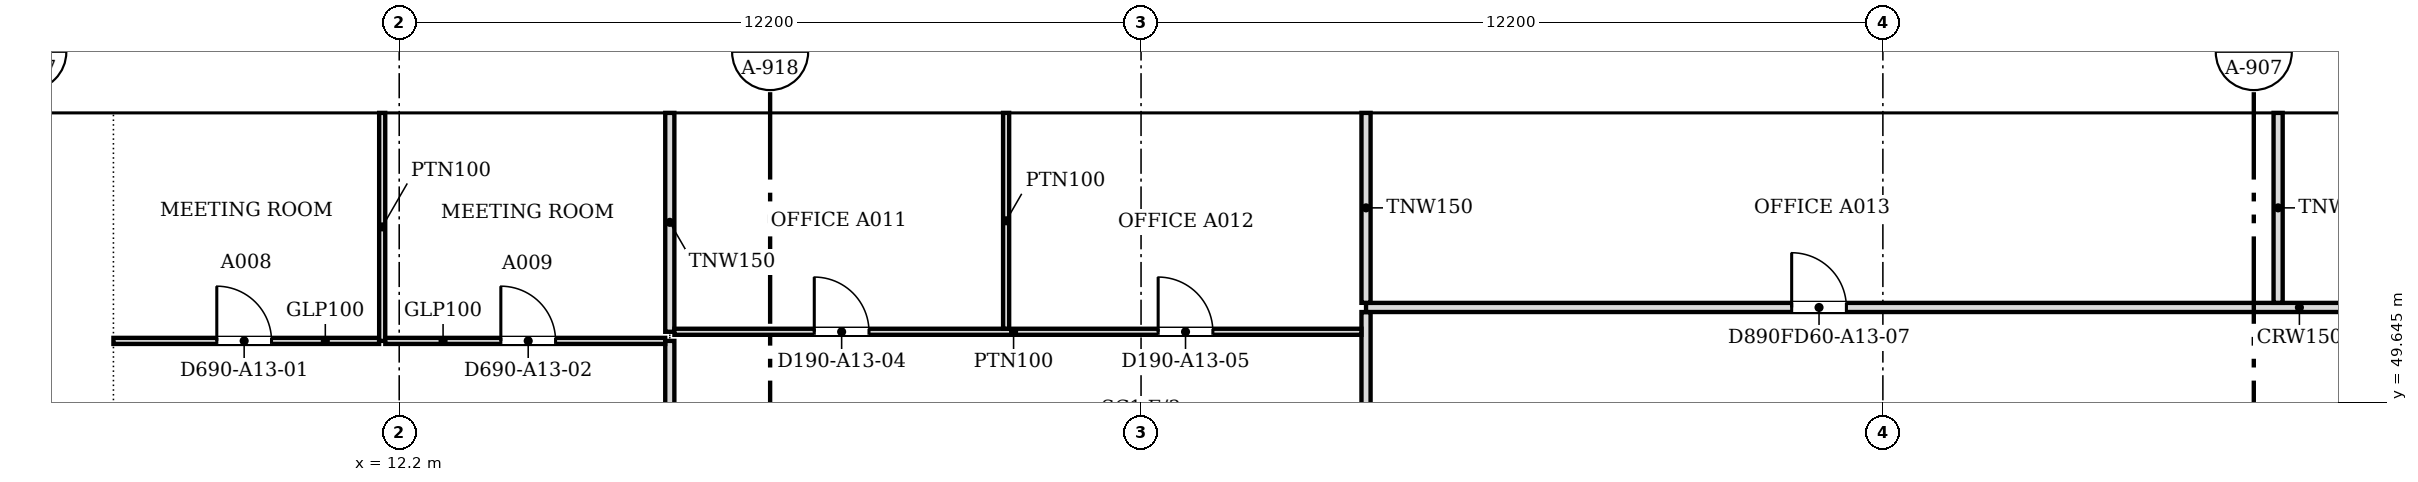
"""IFC4 building model, lengths in metres.
Left out: names, types, materials, properties, quantities, classifications, styles, units other than length and angle.
Written with IfcOpenShell. Run it as: python <this file> out.ifc"""

import sys

from ifc_helpers import new_model, si_unit, direction, frame, frame_2d, origin, place, context, subcontext, project, spatial, polyline, rectangle, outline, extrude, faceted_brep, source, transform, mapped, element, fill, save


model = new_model("IFC4")
c1 = context("Model", 3, precision=1e-05, world=origin(), true_north=direction((0.0, 1.0)))
c2 = subcontext(c1, "Body", "Model", "MODEL_VIEW")
j1 = project(units=[si_unit("LENGTHUNIT", "METRE"), si_unit("PLANEANGLEUNIT", "RADIAN")], contexts=[c1])
p1 = place(None, origin())
s1 = spatial("IfcSite", under=j1, at=p1, CompositionType="ELEMENT")
p2 = place(p1, origin())
s2 = spatial("IfcBuilding", under=s1, at=p2, CompositionType="ELEMENT")
p3 = place(p2, frame((0.0, 0.0, 146.8)))
s3 = spatial("IfcBuildingStorey", under=s2, at=p3, CompositionType="ELEMENT", Elevation=146.8)
m1 = source(origin(), c2, "Body", "SweptSolid", [
    extrude(outline(polyline([(3.05, 0.0), (6.1, 3.8), (3.05, 7.6), (0.0, 3.8), (3.05, 0.0)])), frame((0.0, 0.25, 0.0), z_axis=(0.0, -1.0, 0.0), x_axis=(1.0, 0.0, 0.0)), (0.0, 0.0, 1.0), 0.5),
])
p4 = place(p3, frame((48.8, 54.65, -3.8), z_axis=(0.0, 0.0, 1.0), x_axis=(-1.0, 0.0, 0.0)))
e1 = element("IfcWall", 1, at=p4, inside=s3, PredefinedType="SOLIDWALL", context=c2, shape_type="MappedRepresentation", body=[
    mapped(m1, transform((0.0, 0.0, 0.0), scale=1.0)),
])
m2 = source(origin(), c2, "Body", "SweptSolid", [
    extrude(outline(polyline([(3.05, 0.399), (5.78, 3.8), (3.05, 7.201), (0.321, 3.8), (3.05, 0.399)])), frame((0.0, 0.26, 0.0), z_axis=(0.0, -1.0, 0.0), x_axis=(1.0, 0.0, 0.0)), (0.0, 0.0, 1.0), 0.52),
])
p5 = place(p4, origin())
e2 = element("IfcOpeningElement", 2, at=p5, cuts=e1, PredefinedType="OPENING", context=c2, shape_type="MappedRepresentation", body=[
    mapped(m2, transform((0.0, 0.0, 0.0), scale=1.0)),
])
m3 = source(origin(), c2, "Body", "Brep", [
    faceted_brep([(3.05, -0.25, 0.0), (6.1, -0.25, 3.8), (6.1, -0.25, 3.8), (3.05, -0.25, 7.6), (0.0, -0.25, 3.8), (0.0, 0.25, 3.8), (3.05, 0.25, 7.6), (6.1, 0.25, 3.8), (6.1, 0.25, 3.8), (3.05, 0.25, 0.0)], [[[0, 1, 2, 3, 4]], [[5, 6, 7, 8, 9]], [[9, 8, 1, 0]], [[7, 6, 3, 2]], [[6, 5, 4, 3]], [[5, 9, 0, 4]], [[1, 8, 7, 2]]]),
])
p6 = place(p3, frame((42.7, 54.65, -3.8), z_axis=(0.0, 0.0, 1.0), x_axis=(-1.0, 0.0, 0.0)))
e3 = element("IfcWall", 3, at=p6, inside=s3, PredefinedType="SOLIDWALL", context=c2, shape_type="MappedRepresentation", body=[
    mapped(m3, transform((0.0, 0.0, 0.0), scale=1.0)),
])
p7 = place(p6, origin())
e4 = element("IfcOpeningElement", 4, at=p7, cuts=e3, PredefinedType="OPENING", context=c2, shape_type="MappedRepresentation", body=[
    mapped(m2, transform((0.0, 0.0, 0.0), scale=1.0)),
])
p8 = place(p3, frame((36.6, 54.65, -3.8), z_axis=(0.0, 0.0, 1.0), x_axis=(-1.0, 0.0, 0.0)))
e5 = element("IfcWall", 5, at=p8, inside=s3, PredefinedType="SOLIDWALL", context=c2, shape_type="MappedRepresentation", body=[
    mapped(m1, transform((0.0, 0.0, 0.0), scale=1.0)),
])
p9 = place(p8, origin())
e6 = element("IfcOpeningElement", 6, at=p9, cuts=e5, PredefinedType="OPENING", context=c2, shape_type="MappedRepresentation", body=[
    mapped(m2, transform((0.0, 0.0, 0.0), scale=1.0)),
])
p10 = place(p3, frame((30.5, 54.65, -3.8), z_axis=(0.0, 0.0, 1.0), x_axis=(-1.0, 0.0, 0.0)))
e7 = element("IfcWall", 7, at=p10, inside=s3, PredefinedType="SOLIDWALL", context=c2, shape_type="MappedRepresentation", body=[
    mapped(m1, transform((0.0, 0.0, 0.0), scale=1.0)),
])
p11 = place(p10, origin())
e8 = element("IfcOpeningElement", 8, at=p11, cuts=e7, PredefinedType="OPENING", context=c2, shape_type="MappedRepresentation", body=[
    mapped(m2, transform((0.0, 0.0, 0.0), scale=1.0)),
])
p12 = place(p3, frame((24.4, 54.65, -3.8), z_axis=(0.0, 0.0, 1.0), x_axis=(-1.0, 0.0, 0.0)))
e9 = element("IfcWall", 9, at=p12, inside=s3, PredefinedType="SOLIDWALL", context=c2, shape_type="MappedRepresentation", body=[
    mapped(m3, transform((0.0, 0.0, 0.0), scale=1.0)),
])
p13 = place(p12, origin())
e10 = element("IfcOpeningElement", 10, at=p13, cuts=e9, PredefinedType="OPENING", context=c2, shape_type="MappedRepresentation", body=[
    mapped(m2, transform((0.0, 0.0, 0.0), scale=1.0)),
])
p14 = place(p3, frame((18.3, 54.65, -3.8), z_axis=(0.0, 0.0, 1.0), x_axis=(-1.0, 0.0, 0.0)))
e11 = element("IfcWall", 11, at=p14, inside=s3, PredefinedType="SOLIDWALL", context=c2, shape_type="MappedRepresentation", body=[
    mapped(m1, transform((0.0, 0.0, 0.0), scale=1.0)),
])
p15 = place(p14, origin())
e12 = element("IfcOpeningElement", 12, at=p15, cuts=e11, PredefinedType="OPENING", context=c2, shape_type="MappedRepresentation", body=[
    mapped(m2, transform((0.0, 0.0, 0.0), scale=1.0)),
])
m4 = source(origin(), c2, "Body", "Brep", [
    faceted_brep([(3.05, -0.25, 0.0), (6.053, -0.25, 3.8), (3.05, -0.25, 7.6), (0.0, -0.25, 3.8), (0.0, 0.25, 3.8), (3.05, 0.25, 7.6), (6.007, 0.25, 3.859), (6.007, 0.25, 3.741), (3.05, 0.25, 0.0), (6.053, 0.0, 3.8)], [[[0, 1, 2, 3]], [[4, 5, 6, 7, 8]], [[8, 7, 9, 1, 0]], [[6, 5, 2, 1, 9]], [[5, 4, 3, 2]], [[4, 8, 0, 3]], [[9, 7, 6]]]),
])
p16 = place(p3, frame((12.2, 54.65, -3.8), z_axis=(0.0, 0.0, 1.0), x_axis=(-1.0, 0.0, 0.0)))
e13 = element("IfcWall", 13, at=p16, inside=s3, PredefinedType="SOLIDWALL", context=c2, shape_type="MappedRepresentation", body=[
    mapped(m4, transform((0.0, 0.0, 0.0), scale=1.0)),
])
m5 = source(origin(), c2, "Body", "SweptSolid", [
    extrude(outline(polyline([(3.049, 0.401), (5.735, 3.8), (3.049, 7.199), (0.321, 3.8), (3.049, 0.401)])), frame((0.0, 0.26, 0.0), z_axis=(0.0, -1.0, 0.0), x_axis=(1.0, 0.0, 0.0)), (0.0, 0.0, 1.0), 0.52),
])
p17 = place(p16, origin())
e14 = element("IfcOpeningElement", 14, at=p17, cuts=e13, PredefinedType="OPENING", context=c2, shape_type="MappedRepresentation", body=[
    mapped(m5, transform((0.0, 0.0, 0.0), scale=1.0)),
])
m6 = source(origin(), c2, "Body", "SweptSolid", [
    extrude(outline(polyline([(3.05, 0.0), (6.1, 3.8), (0.0, 3.8), (3.05, 0.0)])), frame((0.0, 0.25, 0.0), z_axis=(0.0, -1.0, 0.0), x_axis=(1.0, 0.0, 0.0)), (0.0, 0.0, 1.0), 0.5),
])
p18 = place(p3, frame((45.75, 54.65, 0.0), z_axis=(0.0, 0.0, 1.0), x_axis=(-1.0, 0.0, 0.0)))
e15 = element("IfcWall", 15, at=p18, inside=s3, PredefinedType="SOLIDWALL", context=c2, shape_type="MappedRepresentation", body=[
    mapped(m6, transform((0.0, 0.0, 0.0), scale=1.0)),
])
m7 = source(origin(), c2, "Body", "SweptSolid", [
    extrude(outline(polyline([(3.05, 0.399), (5.579, 3.55), (0.521, 3.55), (3.05, 0.399)])), frame((0.0, 0.26, 0.0), z_axis=(0.0, -1.0, 0.0), x_axis=(1.0, 0.0, 0.0)), (0.0, 0.0, 1.0), 0.52),
])
p19 = place(p18, origin())
e16 = element("IfcOpeningElement", 16, at=p19, cuts=e15, PredefinedType="OPENING", context=c2, shape_type="MappedRepresentation", body=[
    mapped(m7, transform((0.0, 0.0, 0.0), scale=1.0)),
])
m8 = source(origin(), c2, "Body", "Brep", [
    faceted_brep([(3.05, -0.25, 0.0), (6.1, -0.25, 3.8), (6.1, -0.25, 3.8), (0.0, -0.25, 3.8), (0.0, 0.25, 3.8), (6.1, 0.25, 3.8), (6.1, 0.25, 3.8), (3.05, 0.25, 0.0)], [[[0, 1, 2, 3]], [[4, 5, 6, 7]], [[7, 6, 1, 0]], [[5, 4, 3, 2]], [[4, 7, 0, 3]], [[1, 6, 5, 2]]]),
])
p20 = place(p3, frame((39.65, 54.65, 0.0), z_axis=(0.0, 0.0, 1.0), x_axis=(-1.0, 0.0, 0.0)))
e17 = element("IfcWall", 17, at=p20, inside=s3, PredefinedType="SOLIDWALL", context=c2, shape_type="MappedRepresentation", body=[
    mapped(m8, transform((0.0, 0.0, 0.0), scale=1.0)),
])
p21 = place(p20, origin())
e18 = element("IfcOpeningElement", 18, at=p21, cuts=e17, PredefinedType="OPENING", context=c2, shape_type="MappedRepresentation", body=[
    mapped(m7, transform((0.0, 0.0, 0.0), scale=1.0)),
])
p22 = place(p3, frame((33.55, 54.65, 0.0), z_axis=(0.0, 0.0, 1.0), x_axis=(-1.0, 0.0, 0.0)))
e19 = element("IfcWall", 19, at=p22, inside=s3, PredefinedType="SOLIDWALL", context=c2, shape_type="MappedRepresentation", body=[
    mapped(m6, transform((0.0, 0.0, 0.0), scale=1.0)),
])
p23 = place(p22, origin())
e20 = element("IfcOpeningElement", 20, at=p23, cuts=e19, PredefinedType="OPENING", context=c2, shape_type="MappedRepresentation", body=[
    mapped(m7, transform((0.0, 0.0, 0.0), scale=1.0)),
])
p24 = place(p3, frame((27.45, 54.65, 0.0), z_axis=(0.0, 0.0, 1.0), x_axis=(-1.0, 0.0, 0.0)))
e21 = element("IfcWall", 21, at=p24, inside=s3, PredefinedType="SOLIDWALL", context=c2, shape_type="MappedRepresentation", body=[
    mapped(m8, transform((0.0, 0.0, 0.0), scale=1.0)),
])
p25 = place(p24, origin())
e22 = element("IfcOpeningElement", 22, at=p25, cuts=e21, PredefinedType="OPENING", context=c2, shape_type="MappedRepresentation", body=[
    mapped(m7, transform((0.0, 0.0, 0.0), scale=1.0)),
])
p26 = place(p3, frame((21.35, 54.65, 0.0), z_axis=(0.0, 0.0, 1.0), x_axis=(-1.0, 0.0, 0.0)))
e23 = element("IfcWall", 23, at=p26, inside=s3, PredefinedType="SOLIDWALL", context=c2, shape_type="MappedRepresentation", body=[
    mapped(m6, transform((0.0, 0.0, 0.0), scale=1.0)),
])
p27 = place(p26, origin())
e24 = element("IfcOpeningElement", 24, at=p27, cuts=e23, PredefinedType="OPENING", context=c2, shape_type="MappedRepresentation", body=[
    mapped(m7, transform((0.0, 0.0, 0.0), scale=1.0)),
])
p28 = place(p3, frame((15.25, 54.65, 0.0), z_axis=(0.0, 0.0, 1.0), x_axis=(-1.0, 0.0, 0.0)))
e25 = element("IfcWall", 25, at=p28, inside=s3, PredefinedType="SOLIDWALL", context=c2, shape_type="MappedRepresentation", body=[
    mapped(m6, transform((0.0, 0.0, 0.0), scale=1.0)),
])
p29 = place(p28, origin())
e26 = element("IfcOpeningElement", 26, at=p29, cuts=e25, PredefinedType="OPENING", context=c2, shape_type="MappedRepresentation", body=[
    mapped(m7, transform((0.0, 0.0, 0.0), scale=1.0)),
])
m9 = source(origin(), c2, "Body", "Brep", [
    faceted_brep([(3.003, -0.25, 0.0), (3.05, -0.25, 0.06), (3.05, -0.25, 3.8), (0.0, -0.25, 3.8), (0.0, 0.25, 3.8), (2.957, 0.25, 3.8), (2.957, 0.25, 0.059), (3.003, 0.0, 0.0)], [[[0, 1, 2, 3]], [[4, 5, 6]], [[1, 0, 7]], [[5, 4, 3, 2]], [[4, 6, 7, 0, 3]], [[1, 7, 6, 5, 2]]]),
])
p30 = place(p3, frame((9.15, 54.65, 0.0), z_axis=(0.0, 0.0, 1.0), x_axis=(-1.0, 0.0, 0.0)))
e27 = element("IfcWall", 27, at=p30, inside=s3, PredefinedType="SOLIDWALL", context=c2, shape_type="MappedRepresentation", body=[
    mapped(m9, transform((0.0, 0.0, 0.0), scale=1.0)),
])
m10 = source(origin(), c2, "Body", "SweptSolid", [
    extrude(outline(polyline([(2.803, 3.55), (0.516, 3.55), (2.803, 0.656), (2.803, 3.55)])), frame((0.0, 0.26, 0.0), z_axis=(0.0, -1.0, 0.0), x_axis=(1.0, 0.0, 0.0)), (0.0, 0.0, 1.0), 0.52),
])
p31 = place(p30, origin())
e28 = element("IfcOpeningElement", 28, at=p31, cuts=e27, PredefinedType="OPENING", context=c2, shape_type="MappedRepresentation", body=[
    mapped(m10, transform((0.0, 0.0, 0.0), scale=1.0)),
])
p32 = place(p3, frame((16.65, 47.376, 0.0), z_axis=(0.0, 0.0, 1.0), x_axis=(0.0, 1.0, 0.0)))
e29 = element("IfcWall", 29, at=p32, inside=s3, PredefinedType="PARTITIONING", context=c2, shape_type="SweptSolid", body=[
    extrude(rectangle(XDim=3.274, YDim=0.15, at=frame_2d((1.637, 0.0))), origin(), (0.0, 0.0, 1.0), 2.888),
])
p33 = place(p3, frame((28.1, 47.376, 0.0), z_axis=(0.0, 0.0, 1.0), x_axis=(0.0, 1.0, 0.0)))
e30 = element("IfcWall", 30, at=p33, inside=s3, PredefinedType="PARTITIONING", context=c2, shape_type="SweptSolid", body=[
    extrude(rectangle(XDim=3.748, YDim=0.15, at=frame_2d((1.874, 0.0))), origin(), (0.0, 0.0, 1.0), 2.888),
])
p34 = place(p3, frame((7.5, 50.65, 0.0), z_axis=(0.0, 0.0, 1.0), x_axis=(1.0, 0.0, 0.0)))
e31 = element("IfcWall", 31, at=p34, inside=s3, PredefinedType="PARTITIONING", context=c2, shape_type="SweptSolid", body=[
    extrude(rectangle(XDim=4.369, YDim=0.1, at=frame_2d((2.185, 0.0))), origin(), (0.0, 0.0, 1.0), 2.888),
])
m11 = source(origin(), c2, "Body", "SweptSolid", [
    extrude(rectangle(XDim=0.9, YDim=2.1, at=frame_2d((0.45, 1.05))), frame((0.0, 0.06, 0.0), z_axis=(0.0, -1.0, 0.0), x_axis=(1.0, 0.0, 0.0)), (0.0, 0.0, 1.0), 0.12),
])
p35 = place(p34, frame((1.7, 0.0, 0.0)))
e32 = element("IfcOpeningElement", 32, at=p35, cuts=e31, PredefinedType="OPENING", context=c2, shape_type="MappedRepresentation", body=[
    mapped(m11, transform((0.0, 0.0, 0.0), scale=1.0)),
])
p36 = place(p3, frame((11.92, 50.65, 0.0), z_axis=(0.0, 0.0, 1.0), x_axis=(0.0, 1.0, 0.0)))
e33 = element("IfcWall", 33, at=p36, inside=s3, PredefinedType="PARTITIONING", context=c2, shape_type="SweptSolid", body=[
    extrude(rectangle(XDim=3.75, YDim=0.1, at=frame_2d((1.875, 0.0))), origin(), (0.0, 0.0, 1.0), 2.888),
])
p37 = place(p3, frame((11.971, 50.65, 0.0), z_axis=(0.0, 0.0, 1.0), x_axis=(1.0, 0.0, 0.0)))
e34 = element("IfcWall", 34, at=p37, inside=s3, PredefinedType="PARTITIONING", context=c2, shape_type="SweptSolid", body=[
    extrude(rectangle(XDim=4.603, YDim=0.1, at=frame_2d((2.301, 0.0))), origin(), (0.0, 0.0, 1.0), 2.888),
])
p38 = place(p37, frame((1.9, 0.0, 0.0)))
e35 = element("IfcOpeningElement", 35, at=p38, cuts=e34, PredefinedType="OPENING", context=c2, shape_type="MappedRepresentation", body=[
    mapped(m11, transform((0.0, 0.0, 0.0), scale=1.0)),
])
p39 = place(p3, frame((16.65, 50.8, 0.0), z_axis=(0.0, 0.0, 1.0), x_axis=(0.0, 1.0, 0.0)))
e36 = element("IfcWall", 36, at=p39, inside=s3, PredefinedType="PARTITIONING", context=c2, shape_type="SweptSolid", body=[
    extrude(rectangle(XDim=3.6, YDim=0.15, at=frame_2d((1.8, 0.0))), origin(), (0.0, 0.0, 1.0), 2.888),
])
p40 = place(p3, frame((16.726, 50.8, 0.0), z_axis=(0.0, 0.0, 1.0), x_axis=(1.0, 0.0, 0.0)))
e37 = element("IfcWall", 37, at=p40, inside=s3, PredefinedType="PARTITIONING", context=c2, shape_type="SweptSolid", body=[
    extrude(rectangle(XDim=11.298, YDim=0.1, at=frame_2d((5.649, 0.0))), origin(), (0.0, 0.0, 1.0), 2.888),
])
p41 = place(p40, frame((2.3, 0.0, 0.0)))
e38 = element("IfcOpeningElement", 38, at=p41, cuts=e37, PredefinedType="OPENING", context=c2, shape_type="MappedRepresentation", body=[
    mapped(m11, transform((0.0, 0.0, 0.0), scale=1.0)),
])
p42 = place(p40, frame((7.955, 0.0, 0.0)))
e39 = element("IfcOpeningElement", 39, at=p42, cuts=e37, PredefinedType="OPENING", context=c2, shape_type="MappedRepresentation", body=[
    mapped(m11, transform((0.0, 0.0, 0.0), scale=1.0)),
])
p43 = place(p3, frame((22.181, 50.851, 0.0), z_axis=(0.0, 0.0, 1.0), x_axis=(0.0, 1.0, 0.0)))
e40 = element("IfcWall", 40, at=p43, inside=s3, PredefinedType="PARTITIONING", context=c2, shape_type="SweptSolid", body=[
    extrude(rectangle(XDim=3.549, YDim=0.1, at=frame_2d((1.774, 0.0))), origin(), (0.0, 0.0, 1.0), 2.888),
])
p44 = place(p3, frame((28.1, 51.2, 0.0), z_axis=(0.0, 0.0, 1.0), x_axis=(1.0, 0.0, 0.0)))
e41 = element("IfcWall", 41, at=p44, inside=s3, PredefinedType="PARTITIONING", context=c2, shape_type="SweptSolid", body=[
    extrude(rectangle(XDim=31.438, YDim=0.15, at=frame_2d((15.719, 0.0))), origin(), (0.0, 0.0, 1.0), 2.888),
])
m12 = source(origin(), c2, "Body", "SweptSolid", [
    extrude(rectangle(XDim=0.9, YDim=2.1, at=frame_2d((0.45, 1.05))), frame((0.0, 0.085, 0.0), z_axis=(0.0, -1.0, 0.0), x_axis=(1.0, 0.0, 0.0)), (0.0, 0.0, 1.0), 0.17),
])
p45 = place(p44, frame((7.0, 0.0, 0.0)))
e42 = element("IfcOpeningElement", 42, at=p45, cuts=e41, PredefinedType="OPENING", context=c2, shape_type="MappedRepresentation", body=[
    mapped(m12, transform((0.0, 0.0, 0.0), scale=1.0)),
])
p46 = place(p44, frame((22.8, 0.0, 0.0)))
e43 = element("IfcOpeningElement", 43, at=p46, cuts=e41, PredefinedType="OPENING", context=c2, shape_type="MappedRepresentation", body=[
    mapped(m12, transform((0.0, 0.0, 0.0), scale=1.0)),
])
for number, where, z_axis, x_axis in (
    (44, (28.1, 51.276, 0.0), (0.0, 0.0, 1.0), (0.0, 1.0, 0.0)),
    (45, (43.1, 51.276, 0.0), (0.0, 0.0, 1.0), (0.0, 1.0, 0.0)),
):
    element("IfcWall", number, at=place(p3, frame(where, z_axis=z_axis, x_axis=x_axis)), inside=s3, PredefinedType="PARTITIONING", context=c2, shape_type="SweptSolid", body=[
        extrude(rectangle(XDim=3.124, YDim=0.15, at=frame_2d((1.562, 0.0))), origin(), (0.0, 0.0, 1.0), 2.888),
    ])
m13 = source(origin(), c2, "Body", "SweptSolid", [
    extrude(rectangle(XDim=0.9, YDim=2.1, at=frame_2d((0.45, 1.05))), frame((0.0, 0.025, 0.0), z_axis=(0.0, -1.0, 0.0), x_axis=(1.0, 0.0, 0.0)), (0.0, 0.0, 1.0), 0.05),
])
p47 = place(p35, origin())
e46 = element("IfcDoor", 46, at=p47, inside=s3, OperationType="SINGLE_SWING_LEFT", PredefinedType="DOOR", context=c2, shape_type="MappedRepresentation", body=[
    mapped(m13, transform((0.0, 0.0, 0.0), scale=1.0)),
])
fill(e32, e46)
p48 = place(p38, origin())
e47 = element("IfcDoor", 47, at=p48, inside=s3, OperationType="SINGLE_SWING_LEFT", PredefinedType="DOOR", context=c2, shape_type="MappedRepresentation", body=[
    mapped(m13, transform((0.0, 0.0, 0.0), scale=1.0)),
])
fill(e35, e47)
p49 = place(p41, origin())
e48 = element("IfcDoor", 48, at=p49, inside=s3, OperationType="SINGLE_SWING_LEFT", PredefinedType="DOOR", context=c2, shape_type="MappedRepresentation", body=[
    mapped(m13, transform((0.0, 0.0, 0.0), scale=1.0)),
])
fill(e38, e48)
p50 = place(p42, origin())
e49 = element("IfcDoor", 49, at=p50, inside=s3, OperationType="SINGLE_SWING_LEFT", PredefinedType="DOOR", context=c2, shape_type="MappedRepresentation", body=[
    mapped(m13, transform((0.0, 0.0, 0.0), scale=1.0)),
])
fill(e39, e49)
p51 = place(p45, origin())
e50 = element("IfcDoor", 50, at=p51, inside=s3, OperationType="SINGLE_SWING_LEFT", PredefinedType="DOOR", context=c2, shape_type="MappedRepresentation", body=[
    mapped(m13, transform((0.0, 0.0, 0.0), scale=1.0)),
])
fill(e42, e50)
save(model, sys.argv[1])
